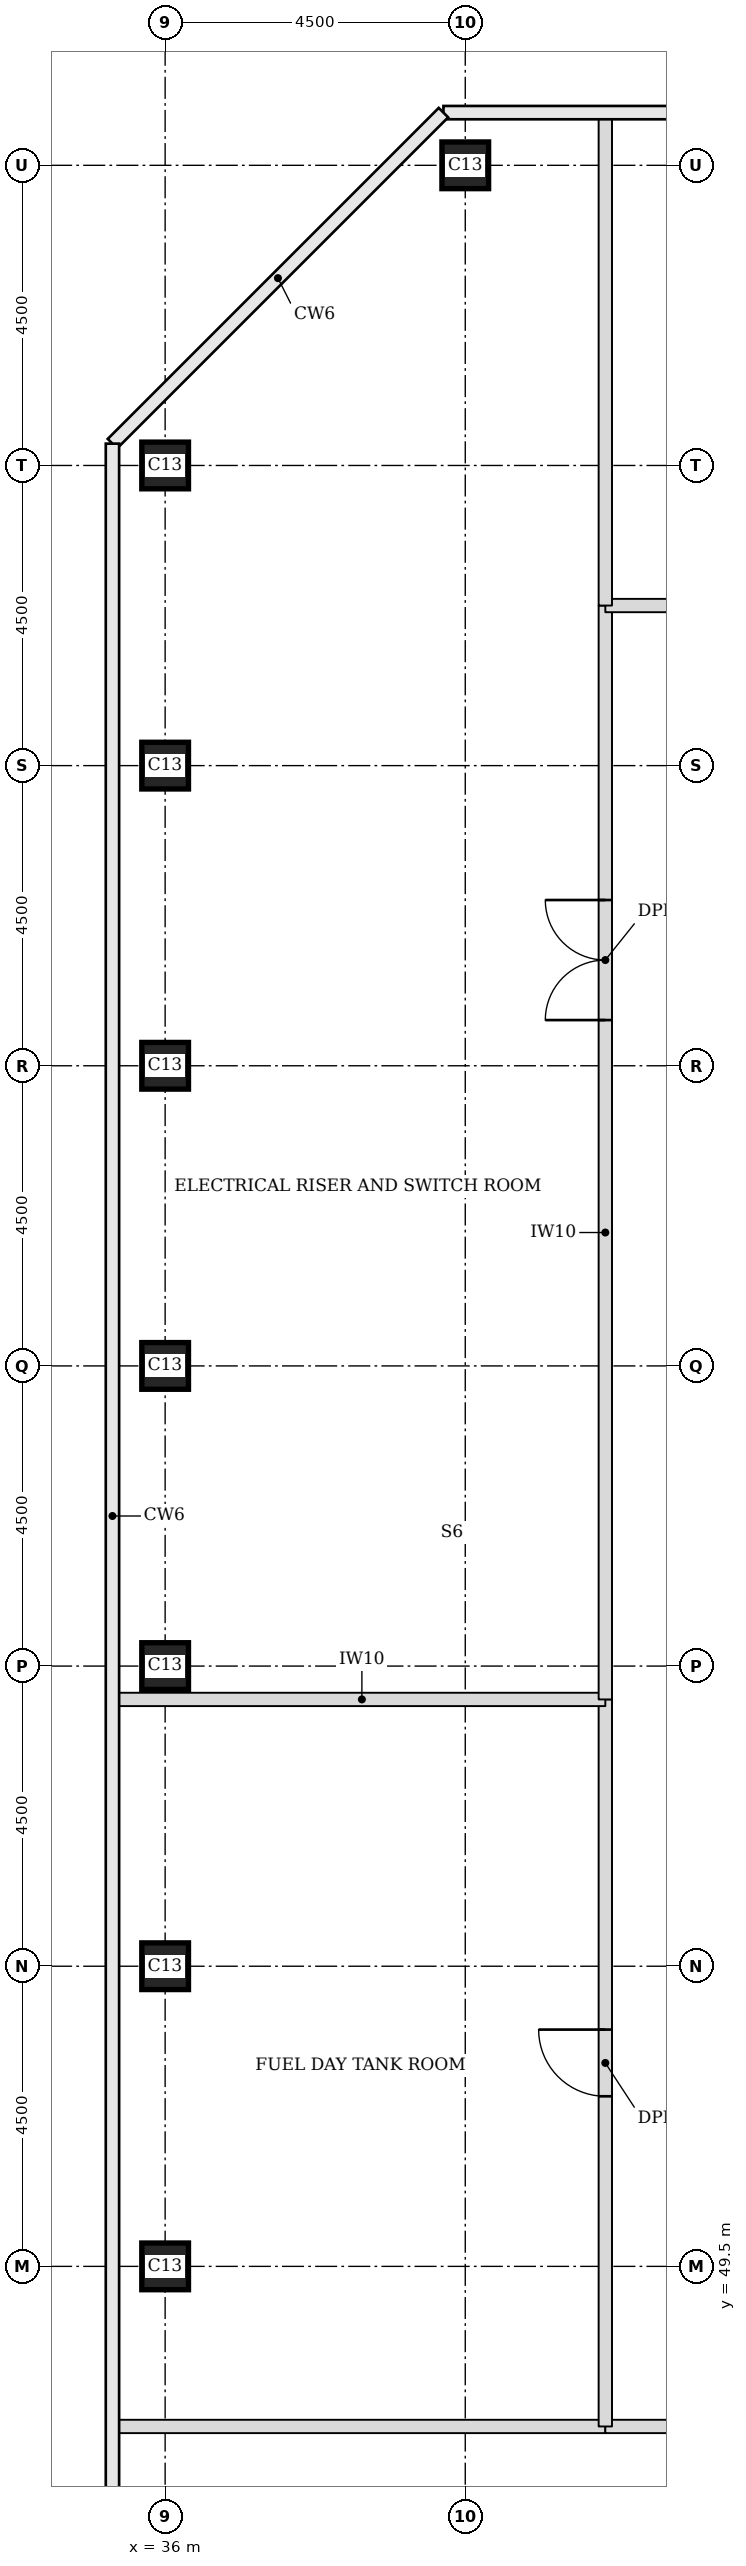
"""IFC4 building model, lengths in metres.
Left out: names, types, materials, properties, quantities, classifications, styles, units other than length and angle.
Written with IfcOpenShell. Run it as: python <this file> out.ifc"""

import sys

from ifc_helpers import new_model, si_unit, direction, frame, frame_2d, origin, origin_2d, place, context, subcontext, project, spatial, rectangle, extrude, element, fill, save


model = new_model("IFC4")
c1 = context("Model", 3, precision=1e-05, world=origin(), true_north=direction((0.0, 1.0)))
c2 = subcontext(c1, "Body", "Model", "MODEL_VIEW")
j1 = project(units=[si_unit("LENGTHUNIT", "METRE"), si_unit("PLANEANGLEUNIT", "RADIAN")], contexts=[c1])
p1 = place(None, origin())
s1 = spatial("IfcSite", under=j1, at=p1, CompositionType="ELEMENT")
p2 = place(p1, origin())
s2 = spatial("IfcBuilding", under=s1, at=p2, CompositionType="ELEMENT")
p3 = place(p2, frame((0.0, 0.0, 268.7)))
s3 = spatial("IfcBuildingStorey", under=s2, at=p3, CompositionType="ELEMENT", Elevation=268.7)
for number, where, z_axis, x_axis in (
    (1, (36.0, 49.5, 0.0), (0.0, 0.0, 1.0), (1.0, 0.0, 0.0)),
    (2, (36.0, 54.0, 0.0), (0.0, 0.0, 1.0), (1.0, 0.0, 0.0)),
    (3, (36.0, 58.5, 0.0), (0.0, 0.0, 1.0), (1.0, 0.0, 0.0)),
    (4, (36.0, 63.0, 0.0), (0.0, 0.0, 1.0), (1.0, 0.0, 0.0)),
    (5, (36.0, 67.5, 0.0), (0.0, 0.0, 1.0), (1.0, 0.0, 0.0)),
    (6, (36.0, 72.0, 0.0), (0.0, 0.0, 1.0), (1.0, 0.0, 0.0)),
    (7, (36.0, 76.5, 0.0), (0.0, 0.0, 1.0), (1.0, 0.0, 0.0)),
    (8, (40.5, 81.0, 0.0), (0.0, 0.0, 1.0), (1.0, 0.0, 0.0)),
):
    element("IfcColumn", number, at=place(p3, frame(where, z_axis=z_axis, x_axis=x_axis)), inside=s3, PredefinedType="COLUMN", context=c2, shape_type="SweptSolid", body=[
        extrude(rectangle(XDim=0.7, YDim=0.7, at=origin_2d()), origin(), (0.0, 0.0, 1.0), 5.0),
    ])
p4 = place(p3, frame((35.3, 47.1, 0.0), z_axis=(0.0, 0.0, 1.0), x_axis=(1.0, 0.0, 0.0)))
e9 = element("IfcWall", 9, at=p4, inside=s3, PredefinedType="PARTITIONING", context=c2, shape_type="SweptSolid", body=[
    extrude(rectangle(XDim=7.3, YDim=0.2, at=frame_2d((3.65, 0.0))), origin(), (0.0, 0.0, 1.0), 4.75),
])
p5 = place(p3, frame((42.6, 47.1, 0.0), z_axis=(0.0, 0.0, 1.0), x_axis=(1.0, 0.0, 0.0)))
e10 = element("IfcWall", 10, at=p5, inside=s3, PredefinedType="PARTITIONING", context=c2, shape_type="SweptSolid", body=[
    extrude(rectangle(XDim=27.3, YDim=0.2, at=frame_2d((13.65, 0.0))), origin(), (0.0, 0.0, 1.0), 4.75),
])
p6 = place(p5, frame((12.75, 0.0, 0.0)))
e11 = element("IfcOpeningElement", 11, at=p6, cuts=e10, PredefinedType="OPENING", context=c2, shape_type="SweptSolid", body=[
    extrude(rectangle(XDim=1.8, YDim=2.1, at=frame_2d((0.9, 1.05))), frame((0.0, 0.11, 0.0), z_axis=(0.0, -1.0, 0.0), x_axis=(1.0, 0.0, 0.0)), (0.0, 0.0, 1.0), 0.22),
])
p7 = place(p3, frame((42.6, 47.1, 0.0), z_axis=(0.0, 0.0, 1.0), x_axis=(0.0, 1.0, 0.0)))
e12 = element("IfcWall", 12, at=p7, inside=s3, PredefinedType="PARTITIONING", context=c2, shape_type="SweptSolid", body=[
    extrude(rectangle(XDim=10.9, YDim=0.2, at=frame_2d((5.45, 0.0))), origin(), (0.0, 0.0, 1.0), 4.75),
])
p8 = place(p7, frame((4.95, 0.0, 0.0)))
e13 = element("IfcOpeningElement", 13, at=p8, cuts=e12, PredefinedType="OPENING", context=c2, shape_type="SweptSolid", body=[
    extrude(rectangle(XDim=1.0, YDim=2.1, at=frame_2d((0.5, 1.05))), frame((0.0, 0.11, 0.0), z_axis=(0.0, -1.0, 0.0), x_axis=(1.0, 0.0, 0.0)), (0.0, 0.0, 1.0), 0.22),
])
p9 = place(p3, frame((35.3, 58.0, 0.0), z_axis=(0.0, 0.0, 1.0), x_axis=(1.0, 0.0, 0.0)))
e14 = element("IfcWall", 14, at=p9, inside=s3, PredefinedType="PARTITIONING", context=c2, shape_type="SweptSolid", body=[
    extrude(rectangle(XDim=7.3, YDim=0.2, at=frame_2d((3.65, 0.0))), origin(), (0.0, 0.0, 1.0), 4.75),
])
p10 = place(p3, frame((42.6, 58.0, 0.0), z_axis=(0.0, 0.0, 1.0), x_axis=(0.0, 1.0, 0.0)))
e15 = element("IfcWall", 15, at=p10, inside=s3, PredefinedType="PARTITIONING", context=c2, shape_type="SweptSolid", body=[
    extrude(rectangle(XDim=16.4, YDim=0.2, at=frame_2d((8.2, 0.0))), origin(), (0.0, 0.0, 1.0), 4.75),
])
p11 = place(p10, frame((10.185, 0.0, 0.0)))
e16 = element("IfcOpeningElement", 16, at=p11, cuts=e15, PredefinedType="OPENING", context=c2, shape_type="SweptSolid", body=[
    extrude(rectangle(XDim=1.8, YDim=2.1, at=frame_2d((0.9, 1.05))), frame((0.0, 0.11, 0.0), z_axis=(0.0, -1.0, 0.0), x_axis=(1.0, 0.0, 0.0)), (0.0, 0.0, 1.0), 0.22),
])
p12 = place(p3, frame((42.6, 74.4, 0.0), z_axis=(0.0, 0.0, 1.0), x_axis=(1.0, 0.0, 0.0)))
e17 = element("IfcWall", 17, at=p12, inside=s3, PredefinedType="PARTITIONING", context=c2, shape_type="SweptSolid", body=[
    extrude(rectangle(XDim=27.3, YDim=0.2, at=frame_2d((13.65, 0.0))), origin(), (0.0, 0.0, 1.0), 4.75),
])
p13 = place(p12, frame((12.75, 0.0, 0.0)))
e18 = element("IfcOpeningElement", 18, at=p13, cuts=e17, PredefinedType="OPENING", context=c2, shape_type="SweptSolid", body=[
    extrude(rectangle(XDim=1.8, YDim=2.1, at=frame_2d((0.9, 1.05))), frame((0.0, 0.11, 0.0), z_axis=(0.0, -1.0, 0.0), x_axis=(1.0, 0.0, 0.0)), (0.0, 0.0, 1.0), 0.22),
])
p14 = place(p3, frame((42.6, 74.4, 0.0), z_axis=(0.0, 0.0, 1.0), x_axis=(0.0, 1.0, 0.0)))
e19 = element("IfcWall", 19, at=p14, inside=s3, PredefinedType="PARTITIONING", context=c2, shape_type="SweptSolid", body=[
    extrude(rectangle(XDim=7.3, YDim=0.2, at=frame_2d((3.65, 0.0))), origin(), (0.0, 0.0, 1.0), 4.75),
])
p15 = place(p8, origin())
e20 = element("IfcDoor", 20, at=p15, inside=s3, OperationType="SINGLE_SWING_RIGHT", PredefinedType="DOOR", context=c2, shape_type="SweptSolid", body=[
    extrude(rectangle(XDim=1.0, YDim=2.1, at=frame_2d((0.5, 1.05))), frame((0.0, 0.025, 0.0), z_axis=(0.0, -1.0, 0.0), x_axis=(1.0, 0.0, 0.0)), (0.0, 0.0, 1.0), 0.05),
])
fill(e13, e20)
p16 = place(p11, origin())
e21 = element("IfcDoor", 21, at=p16, inside=s3, OperationType="DOUBLE_DOOR_SINGLE_SWING", PredefinedType="DOOR", context=c2, shape_type="SweptSolid", body=[
    extrude(rectangle(XDim=1.8, YDim=2.1, at=frame_2d((0.9, 1.05))), frame((0.0, 0.025, 0.0), z_axis=(0.0, -1.0, 0.0), x_axis=(1.0, 0.0, 0.0)), (0.0, 0.0, 1.0), 0.05),
])
fill(e16, e21)
save(model, sys.argv[1])
